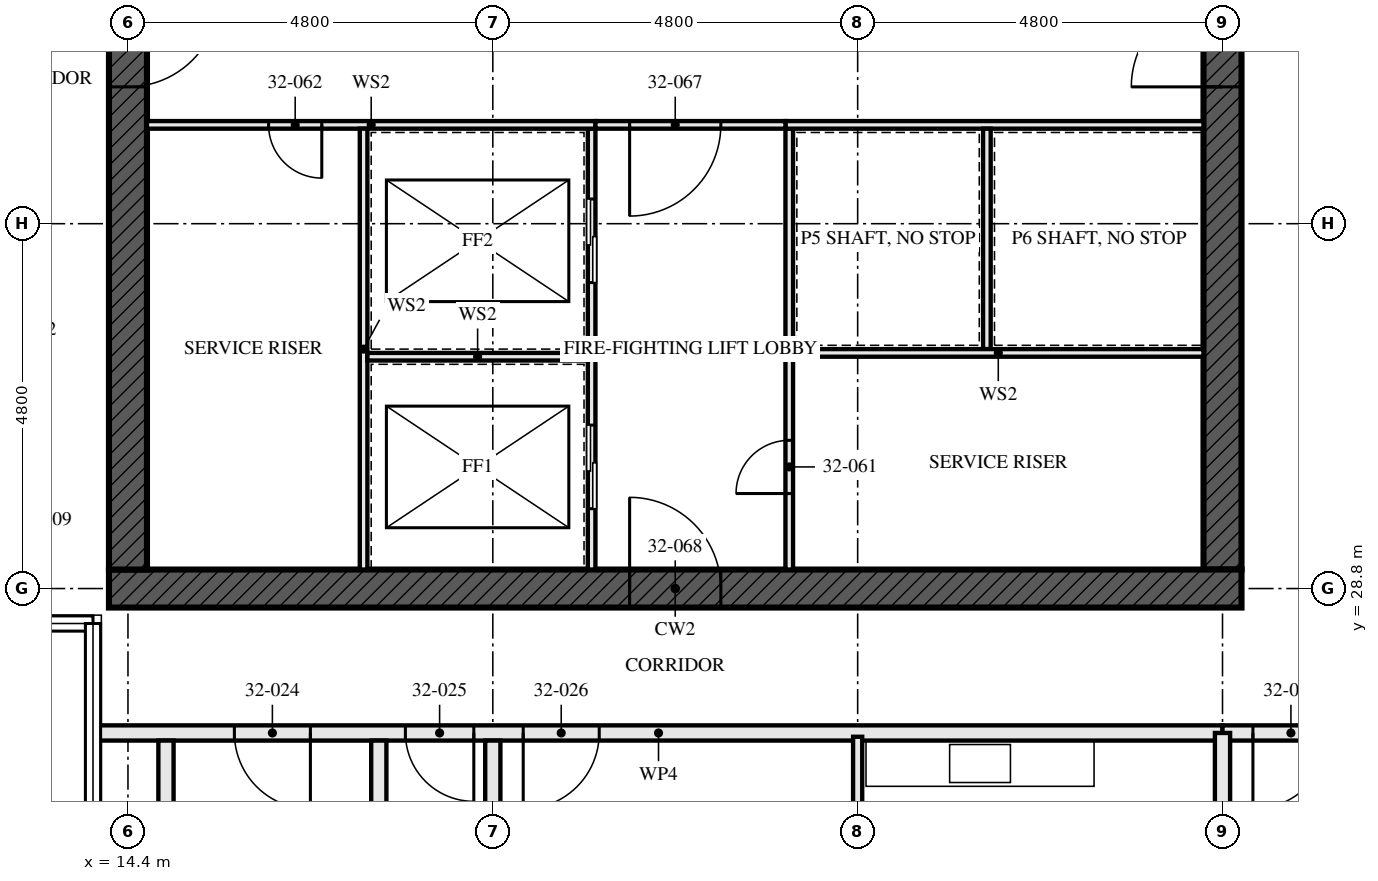
"""IFC4 building model, lengths in metres.
Left out: names, types, materials, properties, quantities, classifications, styles, units other than length and angle.
Written with IfcOpenShell. Run it as: python <this file> out.ifc"""

import sys

from ifc_helpers import new_model, si_unit, direction, frame, frame_2d, origin, place, context, subcontext, project, spatial, rectangle, extrude, element, fill, save


model = new_model("IFC4")
c1 = context("Model", 3, precision=1e-05, world=origin(), true_north=direction((0.0, 1.0)))
c2 = subcontext(c1, "Body", "Model", "MODEL_VIEW")
j1 = project(units=[si_unit("LENGTHUNIT", "METRE"), si_unit("PLANEANGLEUNIT", "RADIAN")], contexts=[c1])
p1 = place(None, origin())
s1 = spatial("IfcSite", under=j1, at=p1, CompositionType="ELEMENT")
p2 = place(p1, origin())
s2 = spatial("IfcBuilding", under=s1, at=p2, CompositionType="ELEMENT")
p3 = place(p2, frame((0.0, 0.0, 119.0)))
s3 = spatial("IfcBuildingStorey", under=s2, at=p3, CompositionType="ELEMENT", Elevation=119.0)
p4 = place(p3, frame((14.15, 28.8, -0.17), z_axis=(0.0, 0.0, 1.0), x_axis=(1.0, 0.0, 0.0)))
e1 = element("IfcWall", 1, at=p4, inside=s3, PredefinedType="SHEAR", context=c2, shape_type="SweptSolid", body=[
    extrude(rectangle(XDim=14.9, YDim=0.5, at=frame_2d((7.45, 0.0))), origin(), (0.0, 0.0, 1.0), 3.5),
])
p5 = place(p4, frame((6.85, 0.0, 0.17)))
e2 = element("IfcOpeningElement", 2, at=p5, cuts=e1, PredefinedType="OPENING", context=c2, shape_type="SweptSolid", body=[
    extrude(rectangle(XDim=1.2, YDim=2.1, at=frame_2d((0.6, 1.05))), frame((0.0, 0.26, 0.0), z_axis=(0.0, -1.0, 0.0), x_axis=(1.0, 0.0, 0.0)), (0.0, 0.0, 1.0), 0.521),
])
p6 = place(p3, frame((14.4, 42.95, -0.17), z_axis=(0.0, 0.0, 1.0), x_axis=(0.0, -1.0, 0.0)))
e3 = element("IfcWall", 3, at=p6, inside=s3, PredefinedType="SHEAR", context=c2, shape_type="SweptSolid", body=[
    extrude(rectangle(XDim=13.9, YDim=0.5, at=frame_2d((6.95, 0.0))), origin(), (0.0, 0.0, 1.0), 3.5),
])
p7 = place(p6, frame((6.35, 0.0, 0.17)))
e4 = element("IfcOpeningElement", 4, at=p7, cuts=e3, PredefinedType="OPENING", context=c2, shape_type="SweptSolid", body=[
    extrude(rectangle(XDim=1.2, YDim=2.1, at=frame_2d((0.6, 1.05))), frame((0.0, 0.26, 0.0), z_axis=(0.0, -1.0, 0.0), x_axis=(1.0, 0.0, 0.0)), (0.0, 0.0, 1.0), 0.521),
])
p8 = place(p3, frame((28.8, 29.05, -0.17), z_axis=(0.0, 0.0, 1.0), x_axis=(0.0, 1.0, 0.0)))
e5 = element("IfcWall", 5, at=p8, inside=s3, PredefinedType="SHEAR", context=c2, shape_type="SweptSolid", body=[
    extrude(rectangle(XDim=13.9, YDim=0.5, at=frame_2d((6.95, 0.0))), origin(), (0.0, 0.0, 1.0), 3.5),
])
p9 = place(p8, frame((6.35, 0.0, 0.17)))
e6 = element("IfcOpeningElement", 6, at=p9, cuts=e5, PredefinedType="OPENING", context=c2, shape_type="SweptSolid", body=[
    extrude(rectangle(XDim=1.2, YDim=2.1, at=frame_2d((0.6, 1.05))), frame((0.0, 0.26, 0.0), z_axis=(0.0, -1.0, 0.0), x_axis=(1.0, 0.0, 0.0)), (0.0, 0.0, 1.0), 0.521),
])
for number, where, z_axis, x_axis in (
    (7, (14.9, 22.1, 0.0), (0.0, 0.0, 1.0), (0.0, 1.0, 0.0)),
    (8, (17.7, 22.1, 0.0), (0.0, 0.0, 1.0), (0.0, 1.0, 0.0)),
):
    element("IfcWall", number, at=place(p3, frame(where, z_axis=z_axis, x_axis=x_axis)), inside=s3, PredefinedType="SOLIDWALL", context=c2, shape_type="SweptSolid", body=[
        extrude(rectangle(XDim=4.7, YDim=0.2, at=frame_2d((2.35, 0.0))), origin(), (0.0, 0.0, 1.0), 2.99),
    ])
p10 = place(p3, frame((19.2, 19.52, 0.0), z_axis=(0.0, 0.0, 1.0), x_axis=(0.0, 1.0, 0.0)))
e9 = element("IfcWall", 9, at=p10, inside=s3, PredefinedType="PARTITIONING", context=c2, shape_type="SweptSolid", body=[
    extrude(rectangle(XDim=7.28, YDim=0.2, at=frame_2d((3.64, 0.0))), origin(), (0.0, 0.0, 1.0), 2.55),
])
p11 = place(p3, frame((24.0, 18.6, 0.0), z_axis=(0.0, 0.0, 1.0), x_axis=(0.0, 1.0, 0.0)))
e10 = element("IfcWall", 10, at=p11, inside=s3, PredefinedType="PARTITIONING", context=c2, shape_type="SweptSolid", body=[
    extrude(rectangle(XDim=8.25, YDim=0.12, at=frame_2d((4.125, 0.0))), origin(), (0.0, 0.0, 1.0), 2.55),
])
p12 = place(p11, frame((5.15, 0.0, 0.0)))
e11 = element("IfcOpeningElement", 11, at=p12, cuts=e10, PredefinedType="OPENING", context=c2, shape_type="SweptSolid", body=[
    extrude(rectangle(XDim=0.9, YDim=2.1, at=frame_2d((0.45, 1.05))), frame((0.0, 0.071, 0.0), z_axis=(0.0, -1.0, 0.0), x_axis=(1.0, 0.0, 0.0)), (0.0, 0.0, 1.0), 0.141),
])
p13 = place(p3, frame((13.96, 26.9, 0.0), z_axis=(0.0, 0.0, 1.0), x_axis=(1.0, 0.0, 0.0)))
e12 = element("IfcWall", 12, at=p13, inside=s3, PredefinedType="PARTITIONING", context=c2, shape_type="SweptSolid", body=[
    extrude(rectangle(XDim=14.84, YDim=0.2, at=frame_2d((7.42, 0.0))), origin(), (0.0, 0.0, 1.0), 2.32),
])
p14 = place(p13, frame((1.84, 0.0, 0.0)))
e13 = element("IfcOpeningElement", 13, at=p14, cuts=e12, PredefinedType="OPENING", context=c2, shape_type="SweptSolid", body=[
    extrude(rectangle(XDim=1.0, YDim=2.1, at=frame_2d((0.5, 1.05))), frame((0.0, 0.111, 0.0), z_axis=(0.0, -1.0, 0.0), x_axis=(1.0, 0.0, 0.0)), (0.0, 0.0, 1.0), 0.221),
])
p15 = place(p13, frame((4.09, 0.0, 0.0)))
e14 = element("IfcOpeningElement", 14, at=p15, cuts=e12, PredefinedType="OPENING", context=c2, shape_type="SweptSolid", body=[
    extrude(rectangle(XDim=0.9, YDim=2.1, at=frame_2d((0.45, 1.05))), frame((0.0, 0.111, 0.0), z_axis=(0.0, -1.0, 0.0), x_axis=(1.0, 0.0, 0.0)), (0.0, 0.0, 1.0), 0.221),
])
p16 = place(p13, frame((5.64, 0.0, 0.0)))
e15 = element("IfcOpeningElement", 15, at=p16, cuts=e12, PredefinedType="OPENING", context=c2, shape_type="SweptSolid", body=[
    extrude(rectangle(XDim=1.0, YDim=2.1, at=frame_2d((0.5, 1.05))), frame((0.0, 0.111, 0.0), z_axis=(0.0, -1.0, 0.0), x_axis=(1.0, 0.0, 0.0)), (0.0, 0.0, 1.0), 0.221),
])
p17 = place(p3, frame((28.8, 26.9, 0.0), z_axis=(0.0, 0.0, 1.0), x_axis=(1.0, 0.0, 0.0)))
e16 = element("IfcWall", 16, at=p17, inside=s3, PredefinedType="PARTITIONING", context=c2, shape_type="SweptSolid", body=[
    extrude(rectangle(XDim=9.6, YDim=0.2, at=frame_2d((4.8, 0.0))), origin(), (0.0, 0.0, 1.0), 3.33),
])
p18 = place(p17, frame((0.4, 0.0, 0.0)))
e17 = element("IfcOpeningElement", 17, at=p18, cuts=e16, PredefinedType="OPENING", context=c2, shape_type="SweptSolid", body=[
    extrude(rectangle(XDim=1.0, YDim=2.1, at=frame_2d((0.5, 1.05))), frame((0.0, 0.111, 0.0), z_axis=(0.0, -1.0, 0.0), x_axis=(1.0, 0.0, 0.0)), (0.0, 0.0, 1.0), 0.221),
])
p19 = place(p17, frame((5.2, 0.0, 0.0)))
e18 = element("IfcOpeningElement", 18, at=p19, cuts=e16, PredefinedType="OPENING", context=c2, shape_type="SweptSolid", body=[
    extrude(rectangle(XDim=1.0, YDim=2.1, at=frame_2d((0.5, 1.05))), frame((0.0, 0.111, 0.0), z_axis=(0.0, -1.0, 0.0), x_axis=(1.0, 0.0, 0.0)), (0.0, 0.0, 1.0), 0.221),
])
p20 = place(p3, frame((20.5, 29.05, 0.0), z_axis=(0.0, 0.0, 1.0), x_axis=(0.0, 1.0, 0.0)))
e19 = element("IfcWall", 19, at=p20, inside=s3, PredefinedType="SOLIDWALL", context=c2, shape_type="SweptSolid", body=[
    extrude(rectangle(XDim=5.8, YDim=0.1, at=frame_2d((2.9, 0.0))), origin(), (0.0, 0.0, 1.0), 3.33),
])
p21 = place(p20, frame((0.8, 0.0, 0.0)))
e20 = element("IfcOpeningElement", 20, at=p21, cuts=e19, PredefinedType="OPENING", context=c2, shape_type="SweptSolid", body=[
    extrude(rectangle(XDim=1.1, YDim=2.3, at=frame_2d((0.55, 1.15))), frame((0.0, 0.061, 0.0), z_axis=(0.0, -1.0, 0.0), x_axis=(1.0, 0.0, 0.0)), (0.0, 0.0, 1.0), 0.121),
])
p22 = place(p20, frame((3.775, 0.0, 0.0)))
e21 = element("IfcOpeningElement", 21, at=p22, cuts=e19, PredefinedType="OPENING", context=c2, shape_type="SweptSolid", body=[
    extrude(rectangle(XDim=1.1, YDim=2.3, at=frame_2d((0.55, 1.15))), frame((0.0, 0.061, 0.0), z_axis=(0.0, -1.0, 0.0), x_axis=(1.0, 0.0, 0.0)), (0.0, 0.0, 1.0), 0.121),
])
p23 = place(p3, frame((23.1, 29.05, 0.0), z_axis=(0.0, 0.0, 1.0), x_axis=(0.0, 1.0, 0.0)))
e22 = element("IfcWall", 22, at=p23, inside=s3, PredefinedType="SOLIDWALL", context=c2, shape_type="SweptSolid", body=[
    extrude(rectangle(XDim=5.8, YDim=0.1, at=frame_2d((2.9, 0.0))), origin(), (0.0, 0.0, 1.0), 3.33),
])
p24 = place(p23, frame((1.0, 0.0, 0.0)))
e23 = element("IfcOpeningElement", 23, at=p24, cuts=e22, PredefinedType="OPENING", context=c2, shape_type="SweptSolid", body=[
    extrude(rectangle(XDim=0.7, YDim=2.1, at=frame_2d((0.35, 1.05))), frame((0.0, 0.061, 0.0), z_axis=(0.0, -1.0, 0.0), x_axis=(1.0, 0.0, 0.0)), (0.0, 0.0, 1.0), 0.121),
])
p25 = place(p3, frame((14.65, 34.9, 0.0), z_axis=(0.0, 0.0, 1.0), x_axis=(1.0, 0.0, 0.0)))
e24 = element("IfcWall", 24, at=p25, inside=s3, PredefinedType="SOLIDWALL", context=c2, shape_type="SweptSolid", body=[
    extrude(rectangle(XDim=5.9, YDim=0.1, at=frame_2d((2.95, 0.0))), origin(), (0.0, 0.0, 1.0), 3.33),
])
p26 = place(p25, frame((1.6, 0.0, 0.0)))
e25 = element("IfcOpeningElement", 25, at=p26, cuts=e24, PredefinedType="OPENING", context=c2, shape_type="SweptSolid", body=[
    extrude(rectangle(XDim=0.7, YDim=2.1, at=frame_2d((0.35, 1.05))), frame((0.0, 0.061, 0.0), z_axis=(0.0, -1.0, 0.0), x_axis=(1.0, 0.0, 0.0)), (0.0, 0.0, 1.0), 0.121),
])
p27 = place(p3, frame((23.05, 34.9, 0.0), z_axis=(0.0, 0.0, 1.0), x_axis=(1.0, 0.0, 0.0)))
e26 = element("IfcWall", 26, at=p27, inside=s3, PredefinedType="SOLIDWALL", context=c2, shape_type="SweptSolid", body=[
    extrude(rectangle(XDim=5.5, YDim=0.1, at=frame_2d((2.75, 0.0))), origin(), (0.0, 0.0, 1.0), 3.33),
])
p28 = place(p3, frame((20.55, 34.9, 0.0), z_axis=(0.0, 0.0, 1.0), x_axis=(1.0, 0.0, 0.0)))
e27 = element("IfcWall", 27, at=p28, inside=s3, PredefinedType="SOLIDWALL", context=c2, shape_type="SweptSolid", body=[
    extrude(rectangle(XDim=2.5, YDim=0.1, at=frame_2d((1.25, 0.0))), origin(), (0.0, 0.0, 1.0), 3.33),
])
p29 = place(p28, frame((0.45, 0.0, 0.0)))
e28 = element("IfcOpeningElement", 28, at=p29, cuts=e27, PredefinedType="OPENING", context=c2, shape_type="SweptSolid", body=[
    extrude(rectangle(XDim=1.2, YDim=2.1, at=frame_2d((0.6, 1.05))), frame((0.0, 0.061, 0.0), z_axis=(0.0, -1.0, 0.0), x_axis=(1.0, 0.0, 0.0)), (0.0, 0.0, 1.0), 0.121),
])
p30 = place(p3, frame((17.5, 29.05, 0.0), z_axis=(0.0, 0.0, 1.0), x_axis=(0.0, 1.0, 0.0)))
e29 = element("IfcWall", 29, at=p30, inside=s3, PredefinedType="SOLIDWALL", context=c2, shape_type="SweptSolid", body=[
    extrude(rectangle(XDim=5.8, YDim=0.1, at=frame_2d((2.9, 0.0))), origin(), (0.0, 0.0, 1.0), 3.33),
])
p31 = place(p3, frame((17.55, 31.85, 0.0), z_axis=(0.0, 0.0, 1.0), x_axis=(1.0, 0.0, 0.0)))
e30 = element("IfcWall", 30, at=p31, inside=s3, PredefinedType="SOLIDWALL", context=c2, shape_type="SweptSolid", body=[
    extrude(rectangle(XDim=2.9, YDim=0.1, at=frame_2d((1.45, 0.0))), origin(), (0.0, 0.0, 1.0), 3.33),
])
p32 = place(p3, frame((25.7, 31.95, 0.0), z_axis=(0.0, 0.0, 1.0), x_axis=(0.0, 1.0, 0.0)))
e31 = element("IfcWall", 31, at=p32, inside=s3, PredefinedType="SOLIDWALL", context=c2, shape_type="SweptSolid", body=[
    extrude(rectangle(XDim=2.9, YDim=0.1, at=frame_2d((1.45, 0.0))), origin(), (0.0, 0.0, 1.0), 3.33),
])
p33 = place(p3, frame((23.15, 31.9, 0.0), z_axis=(0.0, 0.0, 1.0), x_axis=(1.0, 0.0, 0.0)))
e32 = element("IfcWall", 32, at=p33, inside=s3, PredefinedType="SOLIDWALL", context=c2, shape_type="SweptSolid", body=[
    extrude(rectangle(XDim=5.4, YDim=0.1, at=frame_2d((2.7, 0.0))), origin(), (0.0, 0.0, 1.0), 3.33),
])
p34 = place(p3, frame((28.8, 24.345, 0.0), z_axis=(0.0, 0.0, 1.0), x_axis=(0.0, 1.0, 0.0)))
e33 = element("IfcWall", 33, at=p34, inside=s3, PredefinedType="PARTITIONING", context=c2, shape_type="SweptSolid", body=[
    extrude(rectangle(XDim=2.555, YDim=0.2, at=frame_2d((1.277, 0.0))), origin(), (0.0, 0.0, 1.0), 2.32),
])
p35 = place(p14, frame((1.0, 0.0, 0.0), z_axis=(0.0, 0.0, 1.0), x_axis=(-1.0, 0.0, 0.0)))
e34 = element("IfcDoor", 34, at=p35, inside=s3, OperationType="SINGLE_SWING_RIGHT", PredefinedType="DOOR", context=c2, shape_type="SweptSolid", body=[
    extrude(rectangle(XDim=1.0, YDim=2.1, at=frame_2d((0.5, 1.05))), frame((0.0, 0.032, 0.0), z_axis=(0.0, -1.0, 0.0), x_axis=(1.0, 0.0, 0.0)), (0.0, 0.0, 1.0), 0.064),
])
fill(e13, e34)
p36 = place(p15, frame((0.9, 0.0, 0.0), z_axis=(0.0, 0.0, 1.0), x_axis=(-1.0, 0.0, 0.0)))
e35 = element("IfcDoor", 35, at=p36, inside=s3, OperationType="SINGLE_SWING_RIGHT", PredefinedType="DOOR", context=c2, shape_type="SweptSolid", body=[
    extrude(rectangle(XDim=0.9, YDim=2.1, at=frame_2d((0.45, 1.05))), frame((0.0, 0.027, 0.0), z_axis=(0.0, -1.0, 0.0), x_axis=(1.0, 0.0, 0.0)), (0.0, 0.0, 1.0), 0.054),
])
fill(e14, e35)
p37 = place(p16, frame((1.0, 0.0, 0.0), z_axis=(0.0, 0.0, 1.0), x_axis=(-1.0, 0.0, 0.0)))
e36 = element("IfcDoor", 36, at=p37, inside=s3, OperationType="SINGLE_SWING_LEFT", PredefinedType="DOOR", context=c2, shape_type="SweptSolid", body=[
    extrude(rectangle(XDim=1.0, YDim=2.1, at=frame_2d((0.5, 1.05))), frame((0.0, 0.027, 0.0), z_axis=(0.0, -1.0, 0.0), x_axis=(1.0, 0.0, 0.0)), (0.0, 0.0, 1.0), 0.054),
])
fill(e15, e36)
p38 = place(p18, frame((1.0, 0.0, 0.0), z_axis=(0.0, 0.0, 1.0), x_axis=(-1.0, 0.0, 0.0)))
e37 = element("IfcDoor", 37, at=p38, inside=s3, OperationType="SINGLE_SWING_LEFT", PredefinedType="DOOR", context=c2, shape_type="SweptSolid", body=[
    extrude(rectangle(XDim=1.0, YDim=2.1, at=frame_2d((0.5, 1.05))), frame((0.0, 0.027, 0.0), z_axis=(0.0, -1.0, 0.0), x_axis=(1.0, 0.0, 0.0)), (0.0, 0.0, 1.0), 0.054),
])
fill(e17, e37)
p39 = place(p21, origin())
e38 = element("IfcDoor", 38, at=p39, inside=s3, OperationType="SLIDING_TO_LEFT", PredefinedType="DOOR", context=c2, shape_type="SweptSolid", body=[
    extrude(rectangle(XDim=1.1, YDim=2.3, at=frame_2d((0.55, 1.15))), frame((0.0, 0.05, 0.0), z_axis=(0.0, -1.0, 0.0), x_axis=(1.0, 0.0, 0.0)), (0.0, 0.0, 1.0), 0.1),
])
fill(e20, e38)
p40 = place(p22, origin())
e39 = element("IfcDoor", 39, at=p40, inside=s3, OperationType="SLIDING_TO_LEFT", PredefinedType="DOOR", context=c2, shape_type="SweptSolid", body=[
    extrude(rectangle(XDim=1.1, YDim=2.3, at=frame_2d((0.55, 1.15))), frame((0.0, 0.05, 0.0), z_axis=(0.0, -1.0, 0.0), x_axis=(1.0, 0.0, 0.0)), (0.0, 0.0, 1.0), 0.1),
])
fill(e21, e39)
p41 = place(p24, origin())
e40 = element("IfcDoor", 40, at=p41, inside=s3, OperationType="SINGLE_SWING_RIGHT", PredefinedType="DOOR", context=c2, shape_type="SweptSolid", body=[
    extrude(rectangle(XDim=0.7, YDim=2.1, at=frame_2d((0.35, 1.05))), frame((0.0, 0.027, 0.0), z_axis=(0.0, -1.0, 0.0), x_axis=(1.0, 0.0, 0.0)), (0.0, 0.0, 1.0), 0.054),
])
fill(e23, e40)
p42 = place(p26, frame((0.7, 0.0, 0.0), z_axis=(0.0, 0.0, 1.0), x_axis=(-1.0, 0.0, 0.0)))
e41 = element("IfcDoor", 41, at=p42, inside=s3, OperationType="SINGLE_SWING_RIGHT", PredefinedType="DOOR", context=c2, shape_type="SweptSolid", body=[
    extrude(rectangle(XDim=0.7, YDim=2.1, at=frame_2d((0.35, 1.05))), frame((0.0, 0.027, 0.0), z_axis=(0.0, -1.0, 0.0), x_axis=(1.0, 0.0, 0.0)), (0.0, 0.0, 1.0), 0.054),
])
fill(e25, e41)
p43 = place(p29, frame((1.2, 0.0, 0.0), z_axis=(0.0, 0.0, 1.0), x_axis=(-1.0, 0.0, 0.0)))
e42 = element("IfcDoor", 42, at=p43, inside=s3, OperationType="SINGLE_SWING_LEFT", PredefinedType="DOOR", context=c2, shape_type="SweptSolid", body=[
    extrude(rectangle(XDim=1.2, YDim=2.1, at=frame_2d((0.6, 1.05))), frame((0.0, 0.027, 0.0), z_axis=(0.0, -1.0, 0.0), x_axis=(1.0, 0.0, 0.0)), (0.0, 0.0, 1.0), 0.054),
])
fill(e28, e42)
p44 = place(p5, origin())
e43 = element("IfcDoor", 43, at=p44, inside=s3, OperationType="SINGLE_SWING_LEFT", PredefinedType="DOOR", context=c2, shape_type="SweptSolid", body=[
    extrude(rectangle(XDim=1.2, YDim=2.1, at=frame_2d((0.6, 1.05))), frame((0.0, 0.027, 0.0), z_axis=(0.0, -1.0, 0.0), x_axis=(1.0, 0.0, 0.0)), (0.0, 0.0, 1.0), 0.054),
])
fill(e2, e43)
p45 = place(p7, origin())
e44 = element("IfcDoor", 44, at=p45, inside=s3, OperationType="SINGLE_SWING_LEFT", PredefinedType="DOOR", context=c2, shape_type="SweptSolid", body=[
    extrude(rectangle(XDim=1.2, YDim=2.1, at=frame_2d((0.6, 1.05))), frame((0.0, 0.027, 0.0), z_axis=(0.0, -1.0, 0.0), x_axis=(1.0, 0.0, 0.0)), (0.0, 0.0, 1.0), 0.054),
])
fill(e4, e44)
p46 = place(p9, origin())
e45 = element("IfcDoor", 45, at=p46, inside=s3, OperationType="SINGLE_SWING_LEFT", PredefinedType="DOOR", context=c2, shape_type="SweptSolid", body=[
    extrude(rectangle(XDim=1.2, YDim=2.1, at=frame_2d((0.6, 1.05))), frame((0.0, 0.027, 0.0), z_axis=(0.0, -1.0, 0.0), x_axis=(1.0, 0.0, 0.0)), (0.0, 0.0, 1.0), 0.054),
])
fill(e6, e45)
save(model, sys.argv[1])
